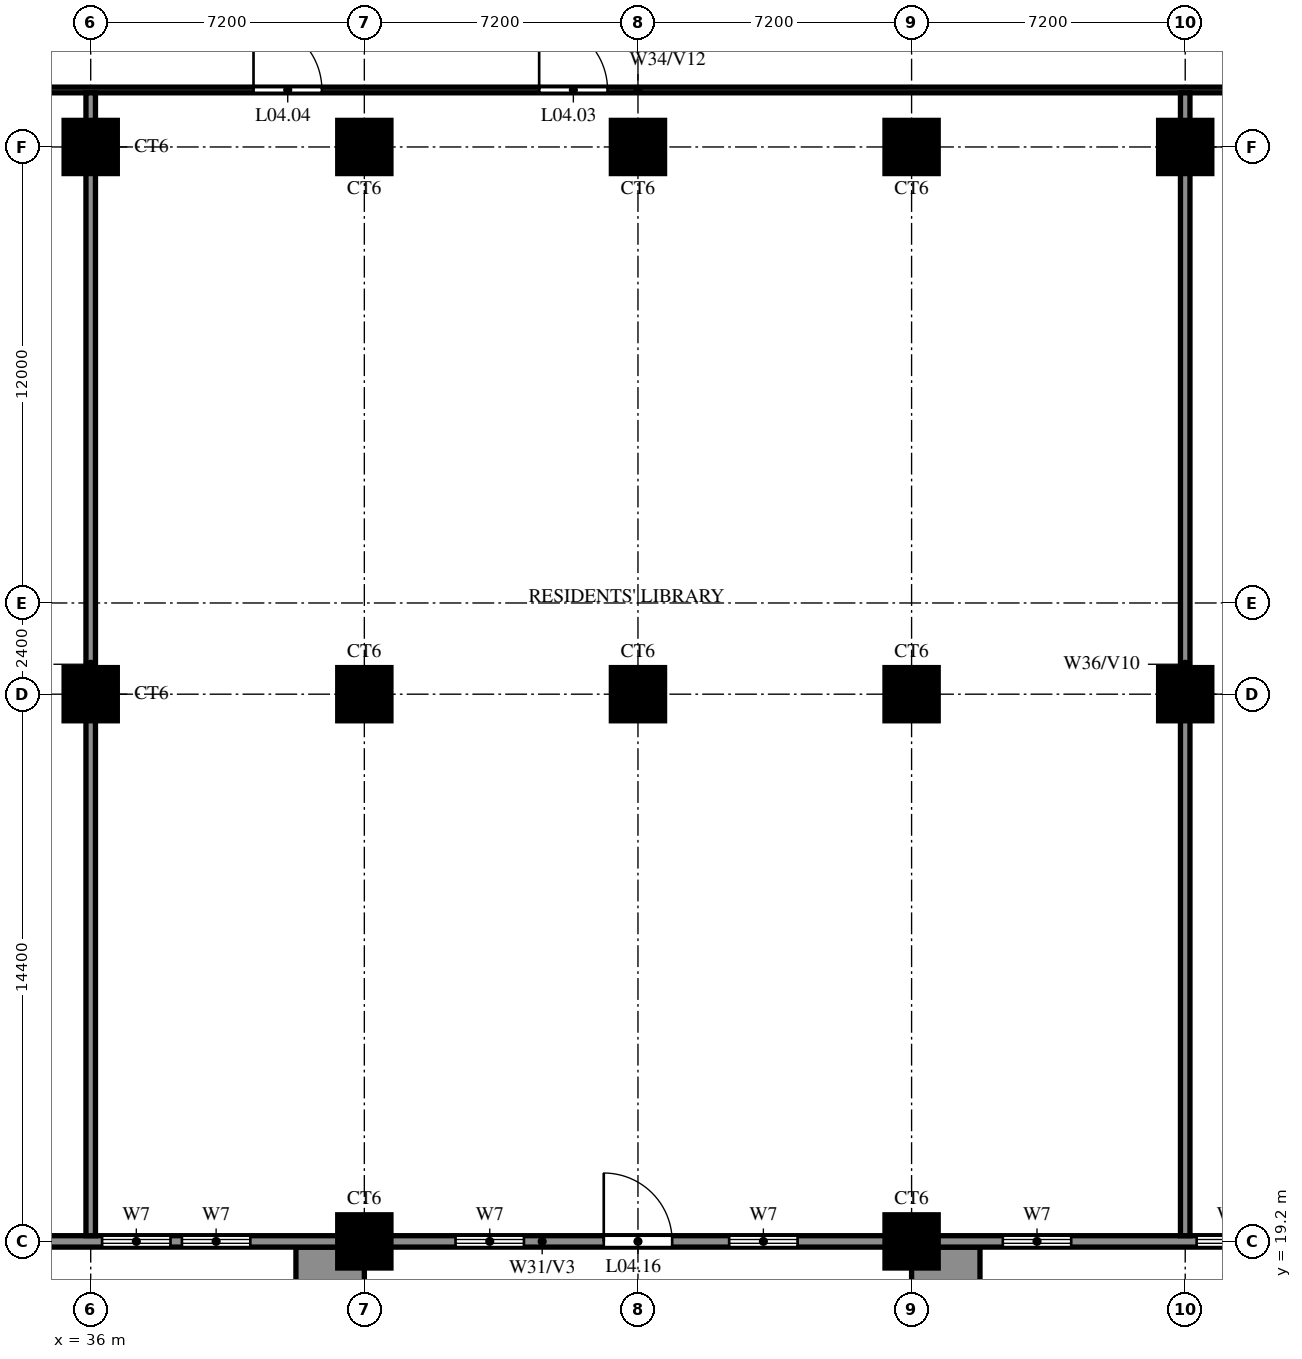
"""IFC4 building model, lengths in metres.
Left out: names, types, materials, properties, quantities, classifications, styles, units other than length and angle.
Written with IfcOpenShell. Run it as: python <this file> out.ifc"""

import sys

from ifc_helpers import new_model, si_unit, direction, frame, frame_2d, origin, origin_2d, place, context, subcontext, project, spatial, rectangle, circle, extrude, source, transform, mapped, element, fill, save


model = new_model("IFC4")
c1 = context("Model", 3, precision=1e-05, world=origin(), true_north=direction((0.0, 1.0)))
c2 = subcontext(c1, "Body", "Model", "MODEL_VIEW")
j1 = project(units=[si_unit("LENGTHUNIT", "METRE"), si_unit("PLANEANGLEUNIT", "RADIAN")], contexts=[c1])
p1 = place(None, origin())
s1 = spatial("IfcSite", under=j1, at=p1, CompositionType="ELEMENT")
p2 = place(p1, origin())
s2 = spatial("IfcBuilding", under=s1, at=p2, CompositionType="ELEMENT")
p3 = place(p2, frame((0.0, 0.0, 21.6)))
s3 = spatial("IfcBuildingStorey", under=s2, at=p3, CompositionType="ELEMENT", Elevation=21.6)
m1 = source(origin(), c2, "Body", "SweptSolid", [
    extrude(circle(Radius=0.7, at=origin_2d()), origin(), (0.0, 0.0, 1.0), 4.95),
])
for number, where, z_axis, x_axis in (
    (1, (43.2, 19.2, 0.0), (0.0, 0.0, 1.0), (1.0, 0.0, 0.0)),
    (2, (57.6, 19.2, 0.0), (0.0, 0.0, 1.0), (1.0, 0.0, 0.0)),
    (3, (36.0, 33.6, 0.0), (0.0, 0.0, 1.0), (1.0, 0.0, 0.0)),
    (4, (43.2, 33.6, 0.0), (0.0, 0.0, 1.0), (1.0, 0.0, 0.0)),
    (5, (50.4, 33.6, 0.0), (0.0, 0.0, 1.0), (1.0, 0.0, 0.0)),
    (6, (57.6, 33.6, 0.0), (0.0, 0.0, 1.0), (1.0, 0.0, 0.0)),
    (7, (64.8, 33.6, 0.0), (0.0, 0.0, 1.0), (1.0, 0.0, 0.0)),
    (8, (36.0, 48.0, 0.0), (0.0, 0.0, 1.0), (1.0, 0.0, 0.0)),
    (9, (43.2, 48.0, 0.0), (0.0, 0.0, 1.0), (1.0, 0.0, 0.0)),
    (10, (50.4, 48.0, 0.0), (0.0, 0.0, 1.0), (1.0, 0.0, 0.0)),
    (11, (57.6, 48.0, 0.0), (0.0, 0.0, 1.0), (1.0, 0.0, 0.0)),
    (12, (64.8, 48.0, 0.0), (0.0, 0.0, 1.0), (1.0, 0.0, 0.0)),
):
    element("IfcColumn", number, at=place(p3, frame(where, z_axis=z_axis, x_axis=x_axis)), inside=s3, PredefinedType="COLUMN", context=c2, shape_type="MappedRepresentation", body=[
        mapped(m1, transform((0.0, 0.0, 0.0))),
    ])
for number, where, z_axis, x_axis in (
    (13, (42.3, -2.55, 0.0), (0.0, 0.0, 1.0), (0.0, 1.0, 0.0)),
    (14, (58.5, -2.55, 0.0), (0.0, 0.0, 1.0), (0.0, 1.0, 0.0)),
):
    element("IfcWall", number, at=place(p3, frame(where, z_axis=z_axis, x_axis=x_axis)), inside=s3, PredefinedType="SOLIDWALL", context=c2, shape_type="SweptSolid", body=[
        extrude(rectangle(XDim=21.6, YDim=1.8, at=frame_2d((10.8, 0.0))), origin(), (0.0, 0.0, 1.0), 4.0),
    ])
p4 = place(p3, frame((0.0, 19.2, 0.0), z_axis=(0.0, 0.0, 1.0), x_axis=(1.0, 0.0, 0.0)))
e15 = element("IfcWall", 15, at=p4, inside=s3, PredefinedType="SOLIDWALL", context=c2, shape_type="SweptSolid", body=[
    extrude(rectangle(XDim=100.8, YDim=0.3, at=frame_2d((50.4, 0.0))), origin(), (0.0, 0.0, 1.0), 4.95),
])
p5 = place(p4, frame((17.1, 0.0, 0.0)))
e16 = element("IfcOpeningElement", 16, at=p5, cuts=e15, PredefinedType="OPENING", context=c2, shape_type="SweptSolid", body=[
    extrude(rectangle(XDim=1.8, YDim=2.1, at=frame_2d((0.9, 1.05))), frame((0.0, 0.16, 0.0), z_axis=(0.0, -1.0, 0.0), x_axis=(1.0, 0.0, 0.0)), (0.0, 0.0, 1.0), 0.32),
])
p6 = place(p4, frame((49.5, 0.0, 0.0)))
e17 = element("IfcOpeningElement", 17, at=p6, cuts=e15, PredefinedType="OPENING", context=c2, shape_type="SweptSolid", body=[
    extrude(rectangle(XDim=1.8, YDim=2.1, at=frame_2d((0.9, 1.05))), frame((0.0, 0.16, 0.0), z_axis=(0.0, -1.0, 0.0), x_axis=(1.0, 0.0, 0.0)), (0.0, 0.0, 1.0), 0.32),
])
p7 = place(p4, frame((2.4, 0.0, 0.6)))
e18 = element("IfcOpeningElement", 18, at=p7, cuts=e15, PredefinedType="OPENING", context=c2, shape_type="SweptSolid", body=[
    extrude(rectangle(XDim=1.8, YDim=2.4, at=frame_2d((0.9, 1.2))), frame((0.0, 0.16, 0.0), z_axis=(0.0, -1.0, 0.0), x_axis=(1.0, 0.0, 0.0)), (0.0, 0.0, 1.0), 0.32),
])
p8 = place(p4, frame((6.0, 0.0, 0.6)))
e19 = element("IfcOpeningElement", 19, at=p8, cuts=e15, PredefinedType="OPENING", context=c2, shape_type="SweptSolid", body=[
    extrude(rectangle(XDim=1.8, YDim=2.4, at=frame_2d((0.9, 1.2))), frame((0.0, 0.16, 0.0), z_axis=(0.0, -1.0, 0.0), x_axis=(1.0, 0.0, 0.0)), (0.0, 0.0, 1.0), 0.32),
])
p9 = place(p4, frame((9.6, 0.0, 0.6)))
e20 = element("IfcOpeningElement", 20, at=p9, cuts=e15, PredefinedType="OPENING", context=c2, shape_type="SweptSolid", body=[
    extrude(rectangle(XDim=1.8, YDim=2.4, at=frame_2d((0.9, 1.2))), frame((0.0, 0.16, 0.0), z_axis=(0.0, -1.0, 0.0), x_axis=(1.0, 0.0, 0.0)), (0.0, 0.0, 1.0), 0.32),
])
p10 = place(p4, frame((20.4, 0.0, 0.6)))
e21 = element("IfcOpeningElement", 21, at=p10, cuts=e15, PredefinedType="OPENING", context=c2, shape_type="SweptSolid", body=[
    extrude(rectangle(XDim=1.8, YDim=2.4, at=frame_2d((0.9, 1.2))), frame((0.0, 0.16, 0.0), z_axis=(0.0, -1.0, 0.0), x_axis=(1.0, 0.0, 0.0)), (0.0, 0.0, 1.0), 0.32),
])
p11 = place(p4, frame((24.0, 0.0, 0.6)))
e22 = element("IfcOpeningElement", 22, at=p11, cuts=e15, PredefinedType="OPENING", context=c2, shape_type="SweptSolid", body=[
    extrude(rectangle(XDim=1.8, YDim=2.4, at=frame_2d((0.9, 1.2))), frame((0.0, 0.16, 0.0), z_axis=(0.0, -1.0, 0.0), x_axis=(1.0, 0.0, 0.0)), (0.0, 0.0, 1.0), 0.32),
])
p12 = place(p4, frame((31.2, 0.0, 0.6)))
e23 = element("IfcOpeningElement", 23, at=p12, cuts=e15, PredefinedType="OPENING", context=c2, shape_type="SweptSolid", body=[
    extrude(rectangle(XDim=1.8, YDim=2.4, at=frame_2d((0.9, 1.2))), frame((0.0, 0.16, 0.0), z_axis=(0.0, -1.0, 0.0), x_axis=(1.0, 0.0, 0.0)), (0.0, 0.0, 1.0), 0.32),
])
p13 = place(p4, frame((36.3, 0.0, 0.6)))
e24 = element("IfcOpeningElement", 24, at=p13, cuts=e15, PredefinedType="OPENING", context=c2, shape_type="SweptSolid", body=[
    extrude(rectangle(XDim=1.8, YDim=2.4, at=frame_2d((0.9, 1.2))), frame((0.0, 0.16, 0.0), z_axis=(0.0, -1.0, 0.0), x_axis=(1.0, 0.0, 0.0)), (0.0, 0.0, 1.0), 0.32),
])
p14 = place(p4, frame((38.4, 0.0, 0.6)))
e25 = element("IfcOpeningElement", 25, at=p14, cuts=e15, PredefinedType="OPENING", context=c2, shape_type="SweptSolid", body=[
    extrude(rectangle(XDim=1.8, YDim=2.4, at=frame_2d((0.9, 1.2))), frame((0.0, 0.16, 0.0), z_axis=(0.0, -1.0, 0.0), x_axis=(1.0, 0.0, 0.0)), (0.0, 0.0, 1.0), 0.32),
])
p15 = place(p4, frame((45.6, 0.0, 0.6)))
e26 = element("IfcOpeningElement", 26, at=p15, cuts=e15, PredefinedType="OPENING", context=c2, shape_type="SweptSolid", body=[
    extrude(rectangle(XDim=1.8, YDim=2.4, at=frame_2d((0.9, 1.2))), frame((0.0, 0.16, 0.0), z_axis=(0.0, -1.0, 0.0), x_axis=(1.0, 0.0, 0.0)), (0.0, 0.0, 1.0), 0.32),
])
p16 = place(p4, frame((52.8, 0.0, 0.6)))
e27 = element("IfcOpeningElement", 27, at=p16, cuts=e15, PredefinedType="OPENING", context=c2, shape_type="SweptSolid", body=[
    extrude(rectangle(XDim=1.8, YDim=2.4, at=frame_2d((0.9, 1.2))), frame((0.0, 0.16, 0.0), z_axis=(0.0, -1.0, 0.0), x_axis=(1.0, 0.0, 0.0)), (0.0, 0.0, 1.0), 0.32),
])
p17 = place(p4, frame((60.0, 0.0, 0.6)))
e28 = element("IfcOpeningElement", 28, at=p17, cuts=e15, PredefinedType="OPENING", context=c2, shape_type="SweptSolid", body=[
    extrude(rectangle(XDim=1.8, YDim=2.4, at=frame_2d((0.9, 1.2))), frame((0.0, 0.16, 0.0), z_axis=(0.0, -1.0, 0.0), x_axis=(1.0, 0.0, 0.0)), (0.0, 0.0, 1.0), 0.32),
])
p18 = place(p4, frame((65.1, 0.0, 0.6)))
e29 = element("IfcOpeningElement", 29, at=p18, cuts=e15, PredefinedType="OPENING", context=c2, shape_type="SweptSolid", body=[
    extrude(rectangle(XDim=1.8, YDim=2.4, at=frame_2d((0.9, 1.2))), frame((0.0, 0.16, 0.0), z_axis=(0.0, -1.0, 0.0), x_axis=(1.0, 0.0, 0.0)), (0.0, 0.0, 1.0), 0.32),
])
p19 = place(p4, frame((67.2, 0.0, 0.6)))
e30 = element("IfcOpeningElement", 30, at=p19, cuts=e15, PredefinedType="OPENING", context=c2, shape_type="SweptSolid", body=[
    extrude(rectangle(XDim=1.8, YDim=2.4, at=frame_2d((0.9, 1.2))), frame((0.0, 0.16, 0.0), z_axis=(0.0, -1.0, 0.0), x_axis=(1.0, 0.0, 0.0)), (0.0, 0.0, 1.0), 0.32),
])
p20 = place(p4, frame((74.4, 0.0, 0.6)))
e31 = element("IfcOpeningElement", 31, at=p20, cuts=e15, PredefinedType="OPENING", context=c2, shape_type="SweptSolid", body=[
    extrude(rectangle(XDim=1.8, YDim=2.4, at=frame_2d((0.9, 1.2))), frame((0.0, 0.16, 0.0), z_axis=(0.0, -1.0, 0.0), x_axis=(1.0, 0.0, 0.0)), (0.0, 0.0, 1.0), 0.32),
])
p21 = place(p4, frame((78.0, 0.0, 0.6)))
e32 = element("IfcOpeningElement", 32, at=p21, cuts=e15, PredefinedType="OPENING", context=c2, shape_type="SweptSolid", body=[
    extrude(rectangle(XDim=1.8, YDim=2.4, at=frame_2d((0.9, 1.2))), frame((0.0, 0.16, 0.0), z_axis=(0.0, -1.0, 0.0), x_axis=(1.0, 0.0, 0.0)), (0.0, 0.0, 1.0), 0.32),
])
p22 = place(p4, frame((81.6, 0.0, 0.6)))
e33 = element("IfcOpeningElement", 33, at=p22, cuts=e15, PredefinedType="OPENING", context=c2, shape_type="SweptSolid", body=[
    extrude(rectangle(XDim=1.8, YDim=2.4, at=frame_2d((0.9, 1.2))), frame((0.0, 0.16, 0.0), z_axis=(0.0, -1.0, 0.0), x_axis=(1.0, 0.0, 0.0)), (0.0, 0.0, 1.0), 0.32),
])
p23 = place(p4, frame((88.8, 0.0, 0.6)))
e34 = element("IfcOpeningElement", 34, at=p23, cuts=e15, PredefinedType="OPENING", context=c2, shape_type="SweptSolid", body=[
    extrude(rectangle(XDim=1.8, YDim=2.4, at=frame_2d((0.9, 1.2))), frame((0.0, 0.16, 0.0), z_axis=(0.0, -1.0, 0.0), x_axis=(1.0, 0.0, 0.0)), (0.0, 0.0, 1.0), 0.32),
])
p24 = place(p4, frame((92.4, 0.0, 0.6)))
e35 = element("IfcOpeningElement", 35, at=p24, cuts=e15, PredefinedType="OPENING", context=c2, shape_type="SweptSolid", body=[
    extrude(rectangle(XDim=1.8, YDim=2.4, at=frame_2d((0.9, 1.2))), frame((0.0, 0.16, 0.0), z_axis=(0.0, -1.0, 0.0), x_axis=(1.0, 0.0, 0.0)), (0.0, 0.0, 1.0), 0.32),
])
p25 = place(p4, frame((96.0, 0.0, 0.6)))
e36 = element("IfcOpeningElement", 36, at=p25, cuts=e15, PredefinedType="OPENING", context=c2, shape_type="SweptSolid", body=[
    extrude(rectangle(XDim=1.8, YDim=2.4, at=frame_2d((0.9, 1.2))), frame((0.0, 0.16, 0.0), z_axis=(0.0, -1.0, 0.0), x_axis=(1.0, 0.0, 0.0)), (0.0, 0.0, 1.0), 0.32),
])
p26 = place(p3, frame((3.75, 49.5, 0.0), z_axis=(0.0, 0.0, 1.0), x_axis=(1.0, 0.0, 0.0)))
e37 = element("IfcWall", 37, at=p26, inside=s3, PredefinedType="PARTITIONING", context=c2, shape_type="SweptSolid", body=[
    extrude(rectangle(XDim=93.3, YDim=0.15, at=frame_2d((46.65, 0.0))), origin(), (0.0, 0.0, 1.0), 3.45),
])
p27 = place(p26, frame((15.175, 0.0, 0.0)))
e38 = element("IfcOpeningElement", 38, at=p27, cuts=e37, PredefinedType="OPENING", context=c2, shape_type="SweptSolid", body=[
    extrude(rectangle(XDim=1.8, YDim=2.1, at=frame_2d((0.9, 1.05))), frame((0.0, 0.085, 0.0), z_axis=(0.0, -1.0, 0.0), x_axis=(1.0, 0.0, 0.0)), (0.0, 0.0, 1.0), 0.17),
])
p28 = place(p26, frame((4.823, 0.0, 0.0)))
e39 = element("IfcOpeningElement", 39, at=p28, cuts=e37, PredefinedType="OPENING", context=c2, shape_type="SweptSolid", body=[
    extrude(rectangle(XDim=1.8, YDim=2.1, at=frame_2d((0.9, 1.05))), frame((0.0, 0.085, 0.0), z_axis=(0.0, -1.0, 0.0), x_axis=(1.0, 0.0, 0.0)), (0.0, 0.0, 1.0), 0.17),
])
p29 = place(p26, frame((44.05, 0.0, 0.0)))
e40 = element("IfcOpeningElement", 40, at=p29, cuts=e37, PredefinedType="OPENING", context=c2, shape_type="SweptSolid", body=[
    extrude(rectangle(XDim=1.8, YDim=2.1, at=frame_2d((0.9, 1.05))), frame((0.0, 0.085, 0.0), z_axis=(0.0, -1.0, 0.0), x_axis=(1.0, 0.0, 0.0)), (0.0, 0.0, 1.0), 0.17),
])
p30 = place(p26, frame((36.534, 0.0, 0.0)))
e41 = element("IfcOpeningElement", 41, at=p30, cuts=e37, PredefinedType="OPENING", context=c2, shape_type="SweptSolid", body=[
    extrude(rectangle(XDim=1.8, YDim=2.1, at=frame_2d((0.9, 1.05))), frame((0.0, 0.085, 0.0), z_axis=(0.0, -1.0, 0.0), x_axis=(1.0, 0.0, 0.0)), (0.0, 0.0, 1.0), 0.17),
])
p31 = place(p26, frame((76.325, 0.0, 0.0)))
e42 = element("IfcOpeningElement", 42, at=p31, cuts=e37, PredefinedType="OPENING", context=c2, shape_type="SweptSolid", body=[
    extrude(rectangle(XDim=1.8, YDim=2.1, at=frame_2d((0.9, 1.05))), frame((0.0, 0.085, 0.0), z_axis=(0.0, -1.0, 0.0), x_axis=(1.0, 0.0, 0.0)), (0.0, 0.0, 1.0), 0.17),
])
p32 = place(p26, frame((65.623, 0.0, 0.0)))
e43 = element("IfcOpeningElement", 43, at=p32, cuts=e37, PredefinedType="OPENING", context=c2, shape_type="SweptSolid", body=[
    extrude(rectangle(XDim=1.8, YDim=2.1, at=frame_2d((0.9, 1.05))), frame((0.0, 0.085, 0.0), z_axis=(0.0, -1.0, 0.0), x_axis=(1.0, 0.0, 0.0)), (0.0, 0.0, 1.0), 0.17),
])
for number, where, z_axis, x_axis in (
    (44, (36.0, 19.35, 0.0), (0.0, 0.0, 1.0), (0.0, 1.0, 0.0)),
    (45, (64.8, 19.35, 0.0), (0.0, 0.0, 1.0), (0.0, 1.0, 0.0)),
):
    element("IfcWall", number, at=place(p3, frame(where, z_axis=z_axis, x_axis=x_axis)), inside=s3, PredefinedType="SOLIDWALL", context=c2, shape_type="SweptSolid", body=[
        extrude(rectangle(XDim=30.075, YDim=0.25, at=frame_2d((15.038, 0.0))), origin(), (0.0, 0.0, 1.0), 3.45),
    ])
p33 = place(p29, origin())
e46 = element("IfcDoor", 46, at=p33, inside=s3, OperationType="DOUBLE_DOOR_SINGLE_SWING", PredefinedType="DOOR", context=c2, shape_type="SweptSolid", body=[
    extrude(rectangle(XDim=1.8, YDim=2.1, at=frame_2d((0.9, 1.05))), frame((0.0, 0.025, 0.0), z_axis=(0.0, -1.0, 0.0), x_axis=(1.0, 0.0, 0.0)), (0.0, 0.0, 1.0), 0.05),
])
fill(e40, e46)
p34 = place(p30, origin())
e47 = element("IfcDoor", 47, at=p34, inside=s3, OperationType="DOUBLE_DOOR_SINGLE_SWING", PredefinedType="DOOR", context=c2, shape_type="SweptSolid", body=[
    extrude(rectangle(XDim=1.8, YDim=2.1, at=frame_2d((0.9, 1.05))), frame((0.0, 0.025, 0.0), z_axis=(0.0, -1.0, 0.0), x_axis=(1.0, 0.0, 0.0)), (0.0, 0.0, 1.0), 0.05),
])
fill(e41, e47)
p35 = place(p6, origin())
e48 = element("IfcDoor", 48, at=p35, inside=s3, OperationType="DOUBLE_DOOR_SINGLE_SWING", PredefinedType="DOOR", context=c2, shape_type="SweptSolid", body=[
    extrude(rectangle(XDim=1.8, YDim=2.1, at=frame_2d((0.9, 1.05))), frame((0.0, 0.025, 0.0), z_axis=(0.0, -1.0, 0.0), x_axis=(1.0, 0.0, 0.0)), (0.0, 0.0, 1.0), 0.05),
])
fill(e17, e48)
p36 = place(p13, origin())
e49 = element("IfcWindow", 49, at=p36, inside=s3, PartitioningType="DOUBLE_PANEL_VERTICAL", PredefinedType="WINDOW", context=c2, shape_type="SweptSolid", body=[
    extrude(rectangle(XDim=1.8, YDim=2.4, at=frame_2d((0.9, 1.2))), frame((0.0, 0.03, 0.0), z_axis=(0.0, -1.0, 0.0), x_axis=(1.0, 0.0, 0.0)), (0.0, 0.0, 1.0), 0.06),
])
fill(e24, e49)
p37 = place(p14, origin())
e50 = element("IfcWindow", 50, at=p37, inside=s3, PartitioningType="DOUBLE_PANEL_VERTICAL", PredefinedType="WINDOW", context=c2, shape_type="SweptSolid", body=[
    extrude(rectangle(XDim=1.8, YDim=2.4, at=frame_2d((0.9, 1.2))), frame((0.0, 0.03, 0.0), z_axis=(0.0, -1.0, 0.0), x_axis=(1.0, 0.0, 0.0)), (0.0, 0.0, 1.0), 0.06),
])
fill(e25, e50)
p38 = place(p15, origin())
e51 = element("IfcWindow", 51, at=p38, inside=s3, PartitioningType="DOUBLE_PANEL_VERTICAL", PredefinedType="WINDOW", context=c2, shape_type="SweptSolid", body=[
    extrude(rectangle(XDim=1.8, YDim=2.4, at=frame_2d((0.9, 1.2))), frame((0.0, 0.03, 0.0), z_axis=(0.0, -1.0, 0.0), x_axis=(1.0, 0.0, 0.0)), (0.0, 0.0, 1.0), 0.06),
])
fill(e26, e51)
p39 = place(p16, origin())
e52 = element("IfcWindow", 52, at=p39, inside=s3, PartitioningType="DOUBLE_PANEL_VERTICAL", PredefinedType="WINDOW", context=c2, shape_type="SweptSolid", body=[
    extrude(rectangle(XDim=1.8, YDim=2.4, at=frame_2d((0.9, 1.2))), frame((0.0, 0.03, 0.0), z_axis=(0.0, -1.0, 0.0), x_axis=(1.0, 0.0, 0.0)), (0.0, 0.0, 1.0), 0.06),
])
fill(e27, e52)
p40 = place(p17, origin())
e53 = element("IfcWindow", 53, at=p40, inside=s3, PartitioningType="DOUBLE_PANEL_VERTICAL", PredefinedType="WINDOW", context=c2, shape_type="SweptSolid", body=[
    extrude(rectangle(XDim=1.8, YDim=2.4, at=frame_2d((0.9, 1.2))), frame((0.0, 0.03, 0.0), z_axis=(0.0, -1.0, 0.0), x_axis=(1.0, 0.0, 0.0)), (0.0, 0.0, 1.0), 0.06),
])
fill(e28, e53)
p41 = place(p18, origin())
e54 = element("IfcWindow", 54, at=p41, inside=s3, PartitioningType="DOUBLE_PANEL_VERTICAL", PredefinedType="WINDOW", context=c2, shape_type="SweptSolid", body=[
    extrude(rectangle(XDim=1.8, YDim=2.4, at=frame_2d((0.9, 1.2))), frame((0.0, 0.03, 0.0), z_axis=(0.0, -1.0, 0.0), x_axis=(1.0, 0.0, 0.0)), (0.0, 0.0, 1.0), 0.06),
])
fill(e29, e54)
save(model, sys.argv[1])
